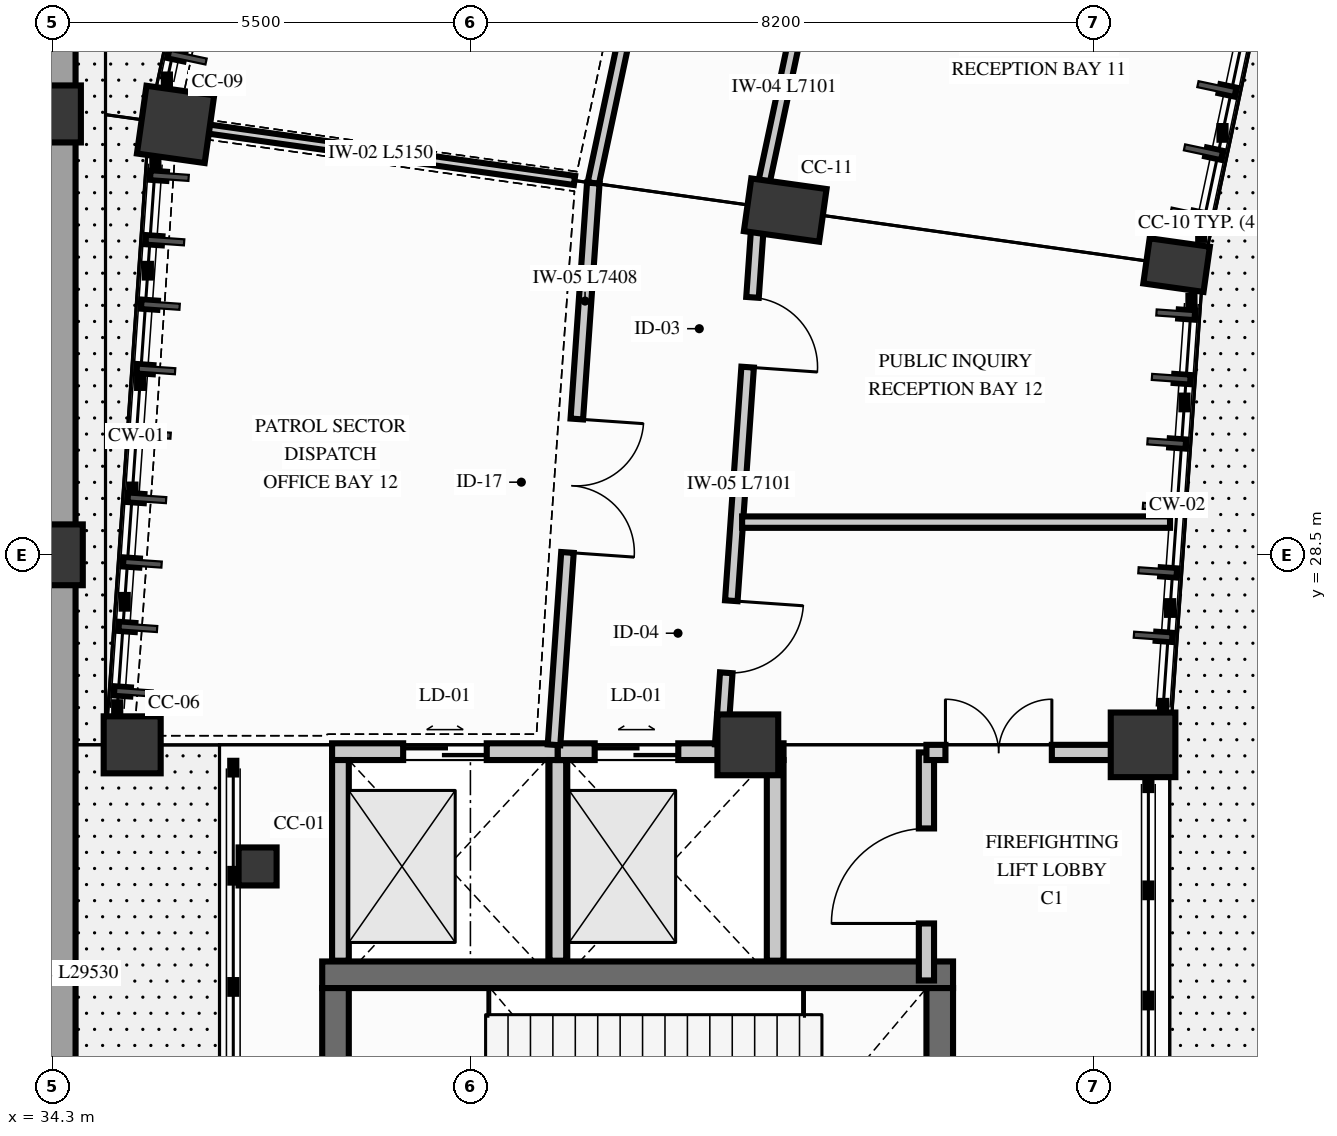
"""IFC4 building model, lengths in metres.
Left out: names, types, materials, properties, quantities, classifications, styles, units other than length and angle.
Written with IfcOpenShell. Run it as: python <this file> out.ifc"""

import sys

from ifc_helpers import new_model, si_unit, direction, frame, frame_2d, origin, origin_2d, place, context, subcontext, project, spatial, rectangle, extrude, element, fill, save


model = new_model("IFC4")
c1 = context("Model", 3, precision=1e-05, world=origin(), true_north=direction((0.0, 1.0)))
c2 = subcontext(c1, "Body", "Model", "MODEL_VIEW")
j1 = project(units=[si_unit("LENGTHUNIT", "METRE"), si_unit("PLANEANGLEUNIT", "RADIAN")], contexts=[c1])
p1 = place(None, origin())
s1 = spatial("IfcSite", under=j1, at=p1, CompositionType="ELEMENT")
p2 = place(p1, origin())
s2 = spatial("IfcBuilding", under=s1, at=p2, CompositionType="ELEMENT")
p3 = place(p2, origin())
s3 = spatial("IfcBuildingStorey", under=s2, at=p3, CompositionType="ELEMENT", Elevation=0.0)
p4 = place(p3, frame((37.85, 22.975, 0.0), z_axis=(0.0, 0.0, 1.0), x_axis=(1.0, 0.0, 0.0)))
e1 = element("IfcWall", 1, at=p4, inside=s3, PredefinedType="SHEAR", context=c2, shape_type="SweptSolid", body=[
    extrude(rectangle(XDim=8.3, YDim=0.35, at=frame_2d((4.15, 0.0))), origin(), (0.0, 0.0, 1.0), 4.88),
])
p5 = place(p3, frame((38.025, 16.0, 0.0), z_axis=(0.0, 0.0, 1.0), x_axis=(0.0, 1.0, 0.0)))
e2 = element("IfcWall", 2, at=p5, inside=s3, PredefinedType="SHEAR", context=c2, shape_type="SweptSolid", body=[
    extrude(rectangle(XDim=6.8, YDim=0.35, at=frame_2d((3.4, 0.0))), origin(), (0.0, 0.0, 1.0), 4.88),
])
p6 = place(p5, frame((2.6, 0.0, 0.0)))
e3 = element("IfcOpeningElement", 3, at=p6, cuts=e2, PredefinedType="OPENING", context=c2, shape_type="SweptSolid", body=[
    extrude(rectangle(XDim=1.32, YDim=2.24, at=frame_2d((0.66, 1.12))), frame((0.0, 0.185, 0.0), z_axis=(0.0, -1.0, 0.0), x_axis=(1.0, 0.0, 0.0)), (0.0, 0.0, 1.0), 0.37),
])
p7 = place(p3, frame((45.975, 16.0, 0.0), z_axis=(0.0, 0.0, 1.0), x_axis=(0.0, 1.0, 0.0)))
e4 = element("IfcWall", 4, at=p7, inside=s3, PredefinedType="SHEAR", context=c2, shape_type="SweptSolid", body=[
    extrude(rectangle(XDim=6.8, YDim=0.35, at=frame_2d((3.4, 0.0))), origin(), (0.0, 0.0, 1.0), 4.88),
])
p8 = place(p3, frame((49.091, 32.312, 0.0), z_axis=(0.0, 0.0, 1.0), x_axis=(0.13917310096, 0.990268068742, 0.0)))
e5 = element("IfcColumn", 5, at=p8, inside=s3, PredefinedType="COLUMN", context=c2, shape_type="SweptSolid", body=[
    extrude(rectangle(XDim=0.6, YDim=0.8, at=origin_2d()), origin(), (0.0, 0.0, 1.0), 5.1),
])
p9 = place(p3, frame((43.942, 33.035, 0.0), z_axis=(0.0, 0.0, 1.0), x_axis=(0.13917310096, 0.990268068742, 0.0)))
e6 = element("IfcColumn", 6, at=p9, inside=s3, PredefinedType="COLUMN", context=c2, shape_type="SweptSolid", body=[
    extrude(rectangle(XDim=0.7, YDim=1.0, at=origin_2d()), origin(), (0.0, 0.0, 1.0), 5.1),
])
p10 = place(p3, frame((35.921, 34.163, 0.0), z_axis=(0.0, 0.0, 1.0), x_axis=(0.13917310096, 0.990268068742, 0.0)))
e7 = element("IfcColumn", 7, at=p10, inside=s3, PredefinedType="COLUMN", context=c2, shape_type="SweptSolid", body=[
    extrude(rectangle(XDim=0.9, YDim=0.9, at=origin_2d()), origin(), (0.0, 0.0, 1.0), 5.1),
])
p11 = place(p3, frame((48.65, 26.0, 0.0), z_axis=(0.0, 0.0, 1.0), x_axis=(0.0, 1.0, 0.0)))
e8 = element("IfcColumn", 8, at=p11, inside=s3, PredefinedType="COLUMN", context=c2, shape_type="SweptSolid", body=[
    extrude(rectangle(XDim=0.85, YDim=0.85, at=origin_2d()), origin(), (0.0, 0.0, 1.0), 5.1),
])
p12 = place(p3, frame((43.45, 26.0, 0.0), z_axis=(0.0, 0.0, 1.0), x_axis=(0.0, 1.0, 0.0)))
e9 = element("IfcColumn", 9, at=p12, inside=s3, PredefinedType="COLUMN", context=c2, shape_type="SweptSolid", body=[
    extrude(rectangle(XDim=0.8, YDim=0.8, at=origin_2d()), origin(), (0.0, 0.0, 1.0), 5.1),
])
p13 = place(p3, frame((35.35, 26.0, 0.0), z_axis=(0.0, 0.0, 1.0), x_axis=(0.0, 1.0, 0.0)))
e10 = element("IfcColumn", 10, at=p13, inside=s3, PredefinedType="COLUMN", context=c2, shape_type="SweptSolid", body=[
    extrude(rectangle(XDim=0.75, YDim=0.75, at=origin_2d()), origin(), (0.0, 0.0, 1.0), 5.1),
])
p14 = place(p3, frame((37.0, 24.4, 0.0), z_axis=(0.0, 0.0, 1.0), x_axis=(1.0, 0.0, 0.0)))
e11 = element("IfcColumn", 11, at=p14, inside=s3, PredefinedType="COLUMN", context=c2, shape_type="SweptSolid", body=[
    extrude(rectangle(XDim=0.5, YDim=0.5, at=origin_2d()), origin(), (0.0, 0.0, 1.0), 5.1),
])
p15 = place(p3, frame((34.3, 28.5, 0.0), z_axis=(0.0, 0.0, 1.0), x_axis=(1.0, 0.0, 0.0)))
e12 = element("IfcColumn", 12, at=p15, inside=s3, PredefinedType="COLUMN", context=c2, shape_type="SweptSolid", body=[
    extrude(rectangle(XDim=0.8, YDim=0.8, at=origin_2d()), origin(), (0.0, 0.0, 1.0), 5.1),
])
p16 = place(p3, frame((34.3, 34.3, 0.0), z_axis=(0.0, 0.0, 1.0), x_axis=(1.0, 0.0, 0.0)))
e13 = element("IfcColumn", 13, at=p16, inside=s3, PredefinedType="COLUMN", context=c2, shape_type="SweptSolid", body=[
    extrude(rectangle(XDim=0.75, YDim=0.75, at=origin_2d()), origin(), (0.0, 0.0, 1.0), 5.1),
])
p17 = place(p3, frame((34.38, 6.76, 0.0), z_axis=(0.0, 0.0, 1.0), x_axis=(0.0, 1.0, 0.0)))
e14 = element("IfcWall", 14, at=p17, inside=s3, PredefinedType="SOLIDWALL", context=c2, shape_type="SweptSolid", body=[
    extrude(rectangle(XDim=29.53, YDim=0.45, at=frame_2d((14.765, 0.0))), origin(), (0.0, 0.0, 1.0), 4.56),
])
p18 = place(p17, frame((1.65, 0.0, 0.85)))
e15 = element("IfcOpeningElement", 15, at=p18, cuts=e14, PredefinedType="OPENING", context=c2, shape_type="SweptSolid", body=[
    extrude(rectangle(XDim=1.3, YDim=2.15, at=frame_2d((0.65, 1.075))), frame((0.0, 0.235, 0.0), z_axis=(0.0, -1.0, 0.0), x_axis=(1.0, 0.0, 0.0)), (0.0, 0.0, 1.0), 0.47),
])
p19 = place(p3, frame((37.98, 25.91, 0.0), z_axis=(0.0, 0.0, 1.0), x_axis=(1.0, 0.0, 0.0)))
e16 = element("IfcWall", 16, at=p19, inside=s3, PredefinedType="PARTITIONING", context=c2, shape_type="SweptSolid", body=[
    extrude(rectangle(XDim=2.97, YDim=0.22, at=frame_2d((1.485, 0.0))), origin(), (0.0, 0.0, 1.0), 4.43),
])
p20 = place(p19, frame((0.935, 0.0, 0.0)))
e17 = element("IfcOpeningElement", 17, at=p20, cuts=e16, PredefinedType="OPENING", context=c2, shape_type="SweptSolid", body=[
    extrude(rectangle(XDim=1.1, YDim=2.15, at=frame_2d((0.55, 1.075))), frame((0.0, 0.12, 0.0), z_axis=(0.0, -1.0, 0.0), x_axis=(1.0, 0.0, 0.0)), (0.0, 0.0, 1.0), 0.24),
])
for number, where, z_axis, x_axis in (
    (18, (38.09, 23.16, 0.0), (0.0, 0.0, 1.0), (0.0, 1.0, 0.0)),
    (19, (40.95, 23.16, 0.0), (0.0, 0.0, 1.0), (0.0, 1.0, 0.0)),
):
    element("IfcWall", number, at=place(p3, frame(where, z_axis=z_axis, x_axis=x_axis)), inside=s3, PredefinedType="PARTITIONING", context=c2, shape_type="SweptSolid", body=[
        extrude(rectangle(XDim=2.64, YDim=0.22, at=frame_2d((1.32, 0.0))), origin(), (0.0, 0.0, 1.0), 4.86),
    ])
p21 = place(p3, frame((40.95, 25.91, 0.0), z_axis=(0.0, 0.0, 1.0), x_axis=(1.0, 0.0, 0.0)))
e20 = element("IfcWall", 20, at=p21, inside=s3, PredefinedType="PARTITIONING", context=c2, shape_type="SweptSolid", body=[
    extrude(rectangle(XDim=2.97, YDim=0.22, at=frame_2d((1.485, 0.0))), origin(), (0.0, 0.0, 1.0), 4.43),
])
p22 = place(p21, frame((0.485, 0.0, 0.0)))
e21 = element("IfcOpeningElement", 21, at=p22, cuts=e20, PredefinedType="OPENING", context=c2, shape_type="SweptSolid", body=[
    extrude(rectangle(XDim=1.1, YDim=2.15, at=frame_2d((0.55, 1.075))), frame((0.0, 0.12, 0.0), z_axis=(0.0, -1.0, 0.0), x_axis=(1.0, 0.0, 0.0)), (0.0, 0.0, 1.0), 0.24),
])
p23 = place(p3, frame((43.81, 23.16, 0.0), z_axis=(0.0, 0.0, 1.0), x_axis=(0.0, 1.0, 0.0)))
e22 = element("IfcWall", 22, at=p23, inside=s3, PredefinedType="PARTITIONING", context=c2, shape_type="SweptSolid", body=[
    extrude(rectangle(XDim=2.64, YDim=0.22, at=frame_2d((1.32, 0.0))), origin(), (0.0, 0.0, 1.0), 4.86),
])
p24 = place(p3, frame((45.8, 22.9, 0.0), z_axis=(0.0, 0.0, 1.0), x_axis=(0.0, 1.0, 0.0)))
e23 = element("IfcWall", 23, at=p24, inside=s3, PredefinedType="PARTITIONING", context=c2, shape_type="SweptSolid", body=[
    extrude(rectangle(XDim=3.0, YDim=0.2, at=frame_2d((1.5, 0.0))), origin(), (0.0, 0.0, 1.0), 4.86),
])
p25 = place(p24, frame((0.75, 0.0, 0.0)))
e24 = element("IfcOpeningElement", 24, at=p25, cuts=e23, PredefinedType="OPENING", context=c2, shape_type="SweptSolid", body=[
    extrude(rectangle(XDim=1.25, YDim=2.2, at=frame_2d((0.625, 1.1))), frame((0.0, 0.11, 0.0), z_axis=(0.0, -1.0, 0.0), x_axis=(1.0, 0.0, 0.0)), (0.0, 0.0, 1.0), 0.22),
])
p26 = place(p3, frame((45.8, 25.9, 0.0), z_axis=(0.0, 0.0, 1.0), x_axis=(1.0, 0.0, 0.0)))
e25 = element("IfcWall", 25, at=p26, inside=s3, PredefinedType="PARTITIONING", context=c2, shape_type="SweptSolid", body=[
    extrude(rectangle(XDim=2.85, YDim=0.2, at=frame_2d((1.425, 0.0))), origin(), (0.0, 0.0, 1.0), 4.48),
])
p27 = place(p26, frame((0.25, 0.0, 0.0)))
e26 = element("IfcOpeningElement", 26, at=p27, cuts=e25, PredefinedType="OPENING", context=c2, shape_type="SweptSolid", body=[
    extrude(rectangle(XDim=1.4, YDim=2.25, at=frame_2d((0.7, 1.125))), frame((0.0, 0.11, 0.0), z_axis=(0.0, -1.0, 0.0), x_axis=(1.0, 0.0, 0.0)), (0.0, 0.0, 1.0), 0.22),
])
p28 = place(p3, frame((45.072, 40.03, 0.0), z_axis=(0.0, 0.0, 1.0), x_axis=(-0.207903987445, -0.978149238104, 0.0)))
e27 = element("IfcWall", 27, at=p28, inside=s3, PredefinedType="PARTITIONING", context=c2, shape_type="SweptSolid", body=[
    extrude(rectangle(XDim=7.101, YDim=0.15, at=frame_2d((3.551, 0.0))), origin(), (0.0, 0.0, 1.0), 4.86),
])
p29 = place(p28, frame((2.982, 0.0, 0.0)))
e28 = element("IfcOpeningElement", 28, at=p29, cuts=e27, PredefinedType="OPENING", context=c2, shape_type="SweptSolid", body=[
    extrude(rectangle(XDim=0.9, YDim=2.1, at=frame_2d((0.45, 1.05))), frame((0.0, 0.085, 0.0), z_axis=(0.0, -1.0, 0.0), x_axis=(1.0, 0.0, 0.0)), (0.0, 0.0, 1.0), 0.17),
])
p30 = place(p3, frame((42.957, 40.636, 0.0), z_axis=(0.0, 0.0, 1.0), x_axis=(-0.207921820376, -0.978145447575, 0.0)))
e29 = element("IfcWall", 29, at=p30, inside=s3, PredefinedType="PARTITIONING", context=c2, shape_type="SweptSolid", body=[
    extrude(rectangle(XDim=7.408, YDim=0.15, at=frame_2d((3.704, 0.0))), origin(), (0.0, 0.0, 1.0), 4.86),
])
p31 = place(p30, frame((3.111, 0.0, 0.0)))
e30 = element("IfcOpeningElement", 30, at=p31, cuts=e29, PredefinedType="OPENING", context=c2, shape_type="SweptSolid", body=[
    extrude(rectangle(XDim=0.9, YDim=2.1, at=frame_2d((0.45, 1.05))), frame((0.0, 0.085, 0.0), z_axis=(0.0, -1.0, 0.0), x_axis=(1.0, 0.0, 0.0)), (0.0, 0.0, 1.0), 0.17),
])
p32 = place(p3, frame((41.169, 33.425, 0.0), z_axis=(0.0, 0.0, 1.0), x_axis=(-0.990266484291, 0.13918437445, 0.0)))
e31 = element("IfcWall", 31, at=p32, inside=s3, PredefinedType="PARTITIONING", context=c2, shape_type="SweptSolid", body=[
    extrude(rectangle(XDim=5.15, YDim=0.12, at=frame_2d((2.575, 0.0))), origin(), (0.0, 0.0, 1.0), 4.43),
])
p33 = place(p3, frame((43.595, 33.084, 0.0), z_axis=(0.0, 0.0, 1.0), x_axis=(-0.069756597752, -0.997564041588, 0.0)))
e32 = element("IfcWall", 32, at=p33, inside=s3, PredefinedType="PARTITIONING", context=c2, shape_type="SweptSolid", body=[
    extrude(rectangle(XDim=7.101, YDim=0.165, at=frame_2d((3.551, 0.0))), origin(), (0.0, 0.0, 1.0), 4.86),
])
p34 = place(p33, frame((5.201, 0.0, 0.0)))
e33 = element("IfcOpeningElement", 33, at=p34, cuts=e32, PredefinedType="OPENING", context=c2, shape_type="SweptSolid", body=[
    extrude(rectangle(XDim=0.95, YDim=2.15, at=frame_2d((0.475, 1.075))), frame((0.0, 0.093, 0.0), z_axis=(0.0, -1.0, 0.0), x_axis=(1.0, 0.0, 0.0)), (0.0, 0.0, 1.0), 0.185),
])
p35 = place(p33, frame((1.2, 0.0, 0.0)))
e34 = element("IfcOpeningElement", 34, at=p35, cuts=e32, PredefinedType="OPENING", context=c2, shape_type="SweptSolid", body=[
    extrude(rectangle(XDim=0.92, YDim=2.12, at=frame_2d((0.46, 1.06))), frame((0.0, 0.093, 0.0), z_axis=(0.0, -1.0, 0.0), x_axis=(1.0, 0.0, 0.0)), (0.0, 0.0, 1.0), 0.185),
])
p36 = place(p3, frame((41.417, 33.39, 0.0), z_axis=(0.0, 0.0, 1.0), x_axis=(-0.069766817412, -0.997563326906, 0.0)))
e35 = element("IfcWall", 35, at=p36, inside=s3, PredefinedType="PARTITIONING", context=c2, shape_type="SweptSolid", body=[
    extrude(rectangle(XDim=7.408, YDim=0.165, at=frame_2d((3.704, 0.0))), origin(), (0.0, 0.0, 1.0), 4.86),
])
p37 = place(p36, frame((3.111, 0.0, 0.0)))
e36 = element("IfcOpeningElement", 36, at=p37, cuts=e35, PredefinedType="OPENING", context=c2, shape_type="SweptSolid", body=[
    extrude(rectangle(XDim=1.76, YDim=2.36, at=frame_2d((0.88, 1.18))), frame((0.0, 0.093, 0.0), z_axis=(0.0, -1.0, 0.0), x_axis=(1.0, 0.0, 0.0)), (0.0, 0.0, 1.0), 0.185),
])
p38 = place(p3, frame((43.375, 28.93, 0.0), z_axis=(0.0, 0.0, 1.0), x_axis=(1.0, 0.0, 0.0)))
e37 = element("IfcWall", 37, at=p38, inside=s3, PredefinedType="PARTITIONING", context=c2, shape_type="SweptSolid", body=[
    extrude(rectangle(XDim=5.63, YDim=0.15, at=frame_2d((2.815, 0.0))), origin(), (0.0, 0.0, 1.0), 4.578),
])
p39 = place(p20, origin())
e38 = element("IfcDoor", 38, at=p39, inside=s3, OperationType="DOUBLE_DOOR_SLIDING", PredefinedType="DOOR", context=c2, shape_type="SweptSolid", body=[
    extrude(rectangle(XDim=1.1, YDim=2.15, at=frame_2d((0.55, 1.075))), frame((0.0, 0.025, 0.0), z_axis=(0.0, -1.0, 0.0), x_axis=(1.0, 0.0, 0.0)), (0.0, 0.0, 1.0), 0.05),
])
fill(e17, e38)
p40 = place(p22, origin())
e39 = element("IfcDoor", 39, at=p40, inside=s3, OperationType="DOUBLE_DOOR_SLIDING", PredefinedType="DOOR", context=c2, shape_type="SweptSolid", body=[
    extrude(rectangle(XDim=1.1, YDim=2.15, at=frame_2d((0.55, 1.075))), frame((0.0, 0.025, 0.0), z_axis=(0.0, -1.0, 0.0), x_axis=(1.0, 0.0, 0.0)), (0.0, 0.0, 1.0), 0.05),
])
fill(e21, e39)
p41 = place(p27, origin())
e40 = element("IfcDoor", 40, at=p41, inside=s3, OperationType="DOUBLE_DOOR_SINGLE_SWING", PredefinedType="DOOR", context=c2, shape_type="SweptSolid", body=[
    extrude(rectangle(XDim=1.4, YDim=2.25, at=frame_2d((0.7, 1.125))), frame((0.0, 0.025, 0.0), z_axis=(0.0, -1.0, 0.0), x_axis=(1.0, 0.0, 0.0)), (0.0, 0.0, 1.0), 0.05),
])
fill(e26, e40)
p42 = place(p25, origin())
e41 = element("IfcDoor", 41, at=p42, inside=s3, OperationType="SINGLE_SWING_LEFT", PredefinedType="DOOR", context=c2, shape_type="SweptSolid", body=[
    extrude(rectangle(XDim=1.25, YDim=2.2, at=frame_2d((0.625, 1.1))), frame((0.0, 0.025, 0.0), z_axis=(0.0, -1.0, 0.0), x_axis=(1.0, 0.0, 0.0)), (0.0, 0.0, 1.0), 0.05),
])
fill(e24, e41)
p43 = place(p34, origin())
e42 = element("IfcDoor", 42, at=p43, inside=s3, OperationType="SINGLE_SWING_LEFT", PredefinedType="DOOR", context=c2, shape_type="SweptSolid", body=[
    extrude(rectangle(XDim=0.95, YDim=2.15, at=frame_2d((0.475, 1.075))), frame((0.0, 0.025, 0.0), z_axis=(0.0, -1.0, 0.0), x_axis=(1.0, 0.0, 0.0)), (0.0, 0.0, 1.0), 0.05),
])
fill(e33, e42)
p44 = place(p35, origin())
e43 = element("IfcDoor", 43, at=p44, inside=s3, OperationType="SINGLE_SWING_RIGHT", PredefinedType="DOOR", context=c2, shape_type="SweptSolid", body=[
    extrude(rectangle(XDim=0.92, YDim=2.12, at=frame_2d((0.46, 1.06))), frame((0.0, 0.025, 0.0), z_axis=(0.0, -1.0, 0.0), x_axis=(1.0, 0.0, 0.0)), (0.0, 0.0, 1.0), 0.05),
])
fill(e34, e43)
p45 = place(p37, origin())
e44 = element("IfcDoor", 44, at=p45, inside=s3, OperationType="DOUBLE_DOOR_SINGLE_SWING", PredefinedType="DOOR", context=c2, shape_type="SweptSolid", body=[
    extrude(rectangle(XDim=1.76, YDim=2.36, at=frame_2d((0.88, 1.18))), frame((0.0, 0.025, 0.0), z_axis=(0.0, -1.0, 0.0), x_axis=(1.0, 0.0, 0.0)), (0.0, 0.0, 1.0), 0.05),
])
fill(e36, e44)
save(model, sys.argv[1])
